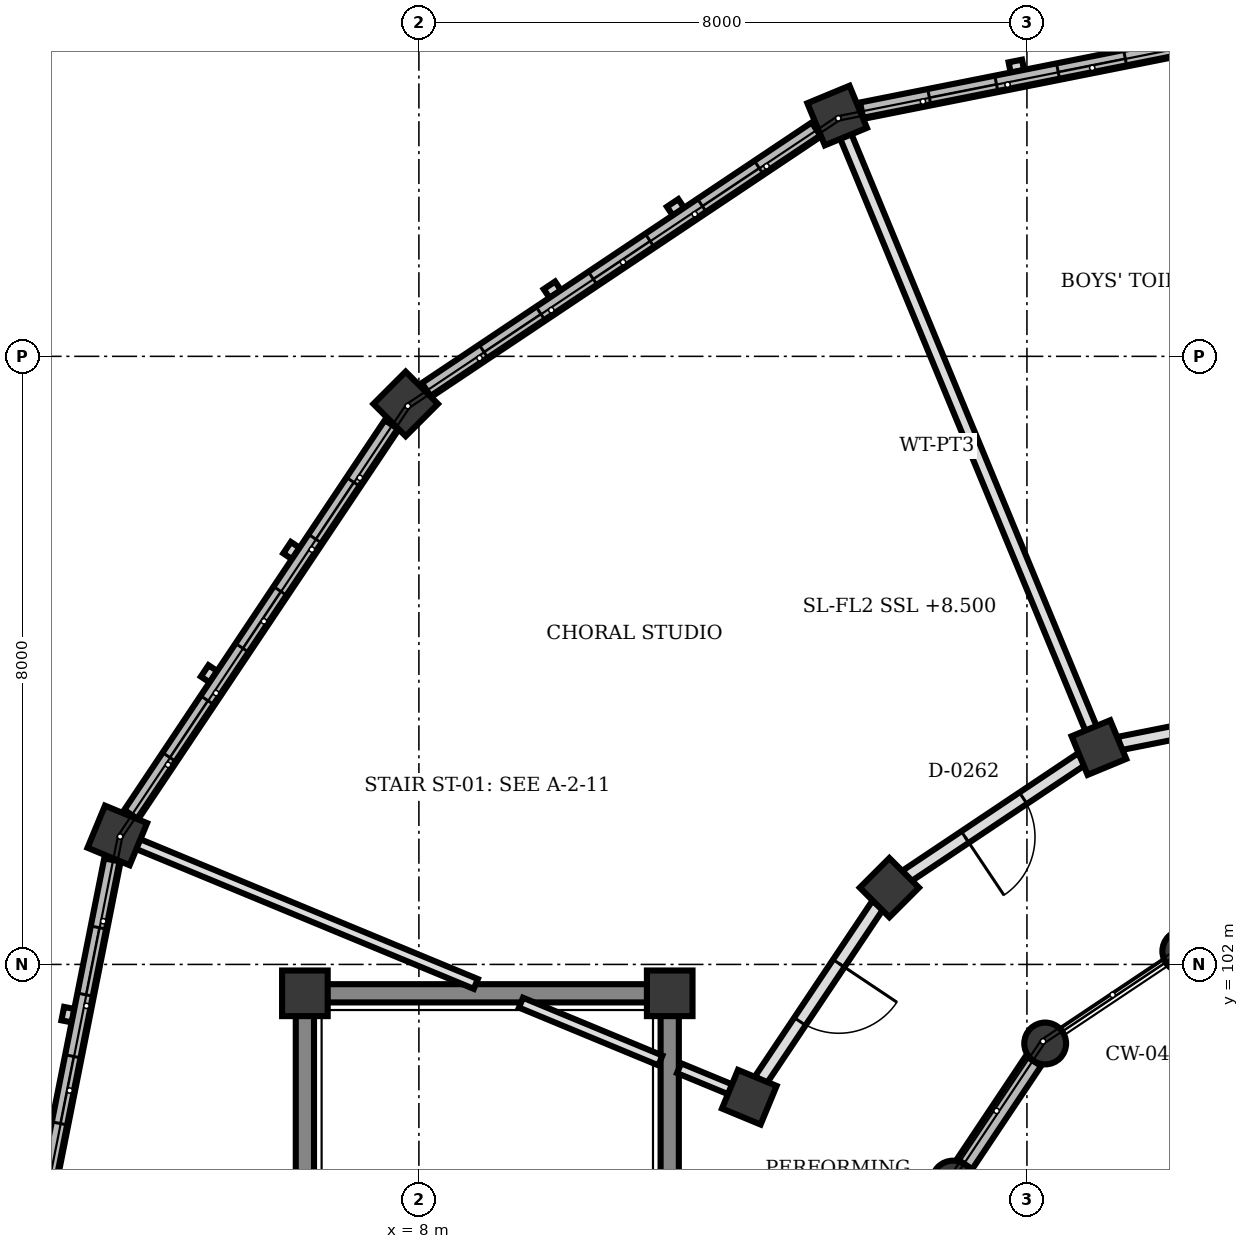
"""IFC4 building model, lengths in metres.
Left out: names, types, materials, properties, quantities, classifications, styles, units other than length and angle.
Written with IfcOpenShell. Run it as: python <this file> out.ifc"""

import sys

from ifc_helpers import new_model, si_unit, direction, frame, frame_2d, origin, origin_2d, place, context, subcontext, project, spatial, rectangle, circle, extrude, element, fill, save


model = new_model("IFC4")
c1 = context("Model", 3, precision=1e-05, world=origin(), true_north=direction((0.0, 1.0)))
c2 = subcontext(c1, "Body", "Model", "MODEL_VIEW")
j1 = project(units=[si_unit("LENGTHUNIT", "METRE"), si_unit("PLANEANGLEUNIT", "RADIAN")], contexts=[c1])
p1 = place(None, origin())
s1 = spatial("IfcSite", under=j1, at=p1, CompositionType="ELEMENT")
p2 = place(p1, origin())
s2 = spatial("IfcBuilding", under=s1, at=p2, CompositionType="ELEMENT")
p3 = place(p2, frame((0.0, 0.0, 8.5)))
s3 = spatial("IfcBuildingStorey", under=s2, at=p3, CompositionType="ELEMENT", Elevation=8.5)
for number, where, z_axis, x_axis in (
    (1, (11.3, 101.62, 0.0), (0.0, 0.0, 1.0), (1.0, 0.0, 0.0)),
    (2, (6.5, 101.62, 0.0), (0.0, 0.0, 1.0), (1.0, 0.0, 0.0)),
):
    element("IfcColumn", number, at=place(p3, frame(where, z_axis=z_axis, x_axis=x_axis)), inside=s3, PredefinedType="COLUMN", context=c2, shape_type="SweptSolid", body=[
        extrude(rectangle(XDim=0.6, YDim=0.6, at=origin_2d()), origin(), (0.0, 0.0, 1.0), 4.0),
    ])
for number, where, z_axis, x_axis in (
    (3, (18.057, 102.174, 0.0), (0.0, 0.0, 1.0), (1.0, 0.0, 0.0)),
    (4, (16.24, 100.96, 0.0), (0.0, 0.0, 1.0), (1.0, 0.0, 0.0)),
    (5, (15.026, 99.143, 0.0), (0.0, 0.0, 1.0), (1.0, 0.0, 0.0)),
):
    element("IfcColumn", number, at=place(p3, frame(where, z_axis=z_axis, x_axis=x_axis)), inside=s3, PredefinedType="COLUMN", context=c2, shape_type="SweptSolid", body=[
        extrude(circle(Radius=0.275, at=origin_2d()), origin(), (0.0, 0.0, 1.0), 4.0),
    ])
for number, where, z_axis, x_axis in (
    (6, (16.947, 104.853, 0.0), (0.0, 0.0, 1.0), (-0.383, 0.924, 0.0)),
    (7, (14.19, 103.01, 0.0), (0.0, 0.0, 1.0), (-0.707, 0.707, 0.0)),
    (8, (12.347, 100.253, 0.0), (0.0, 0.0, 1.0), (-0.924, 0.383, 0.0)),
):
    element("IfcColumn", number, at=place(p3, frame(where, z_axis=z_axis, x_axis=x_axis)), inside=s3, PredefinedType="COLUMN", context=c2, shape_type="SweptSolid", body=[
        extrude(rectangle(XDim=0.55, YDim=0.55, at=origin_2d()), origin(), (0.0, 0.0, 1.0), 4.0),
    ])
for number, where, z_axis, x_axis in (
    (9, (13.503, 113.168, 0.0), (0.0, 0.0, 1.0), (-0.383, 0.924, 0.0)),
    (10, (7.826, 109.374, 0.0), (0.0, 0.0, 1.0), (-0.707, 0.707, 0.0)),
    (11, (4.032, 103.697, 0.0), (0.0, 0.0, 1.0), (-0.924, 0.383, 0.0)),
):
    element("IfcColumn", number, at=place(p3, frame(where, z_axis=z_axis, x_axis=x_axis)), inside=s3, PredefinedType="COLUMN", context=c2, shape_type="SweptSolid", body=[
        extrude(rectangle(XDim=0.6, YDim=0.6, at=origin_2d()), origin(), (0.0, 0.0, 1.0), 4.0),
    ])
p4 = place(p3, frame((13.826, 113.232, 0.0), z_axis=(0.0, 0.0, 1.0), x_axis=(0.980770460131, 0.195164813773, 0.0)))
e12 = element("IfcWall", 12, at=p4, inside=s3, PredefinedType="SOLIDWALL", context=c2, shape_type="SweptSolid", body=[
    extrude(rectangle(XDim=6.17, YDim=0.22, at=frame_2d((3.085, 0.0))), origin(), (0.0, 0.0, 1.0), 3.172),
])
p5 = place(p4, frame((0.907, 0.0, 0.85)))
e13 = element("IfcOpeningElement", 13, at=p5, cuts=e12, PredefinedType="OPENING", context=c2, shape_type="SweptSolid", body=[
    extrude(rectangle(XDim=0.9, YDim=1.4, at=frame_2d((0.45, 0.7))), frame((0.0, 0.12, 0.0), z_axis=(0.0, -1.0, 0.0), x_axis=(1.0, 0.0, 0.0)), (0.0, 0.0, 1.0), 0.24),
])
p6 = place(p4, frame((2.635, 0.0, 0.85)))
e14 = element("IfcOpeningElement", 14, at=p6, cuts=e12, PredefinedType="OPENING", context=c2, shape_type="SweptSolid", body=[
    extrude(rectangle(XDim=0.9, YDim=1.4, at=frame_2d((0.45, 0.7))), frame((0.0, 0.12, 0.0), z_axis=(0.0, -1.0, 0.0), x_axis=(1.0, 0.0, 0.0)), (0.0, 0.0, 1.0), 0.24),
])
p7 = place(p4, frame((4.362, 0.0, 0.85)))
e15 = element("IfcOpeningElement", 15, at=p7, cuts=e12, PredefinedType="OPENING", context=c2, shape_type="SweptSolid", body=[
    extrude(rectangle(XDim=0.9, YDim=1.4, at=frame_2d((0.45, 0.7))), frame((0.0, 0.12, 0.0), z_axis=(0.0, -1.0, 0.0), x_axis=(1.0, 0.0, 0.0)), (0.0, 0.0, 1.0), 0.24),
])
p8 = place(p3, frame((8.1, 109.557, 0.0), z_axis=(0.0, 0.0, 1.0), x_axis=(0.831379966495, 0.555704374025, 0.0)))
e16 = element("IfcWall", 16, at=p8, inside=s3, PredefinedType="SOLIDWALL", context=c2, shape_type="SweptSolid", body=[
    extrude(rectangle(XDim=6.169, YDim=0.22, at=frame_2d((3.084, 0.0))), origin(), (0.0, 0.0, 1.0), 3.172),
])
p9 = place(p8, frame((0.907, 0.0, 0.85)))
e17 = element("IfcOpeningElement", 17, at=p9, cuts=e16, PredefinedType="OPENING", context=c2, shape_type="SweptSolid", body=[
    extrude(rectangle(XDim=0.9, YDim=1.4, at=frame_2d((0.45, 0.7))), frame((0.0, 0.12, 0.0), z_axis=(0.0, -1.0, 0.0), x_axis=(1.0, 0.0, 0.0)), (0.0, 0.0, 1.0), 0.24),
])
p10 = place(p8, frame((2.635, 0.0, 0.85)))
e18 = element("IfcOpeningElement", 18, at=p10, cuts=e16, PredefinedType="OPENING", context=c2, shape_type="SweptSolid", body=[
    extrude(rectangle(XDim=0.9, YDim=1.4, at=frame_2d((0.45, 0.7))), frame((0.0, 0.12, 0.0), z_axis=(0.0, -1.0, 0.0), x_axis=(1.0, 0.0, 0.0)), (0.0, 0.0, 1.0), 0.24),
])
p11 = place(p8, frame((4.362, 0.0, 0.85)))
e19 = element("IfcOpeningElement", 19, at=p11, cuts=e16, PredefinedType="OPENING", context=c2, shape_type="SweptSolid", body=[
    extrude(rectangle(XDim=0.9, YDim=1.4, at=frame_2d((0.45, 0.7))), frame((0.0, 0.12, 0.0), z_axis=(0.0, -1.0, 0.0), x_axis=(1.0, 0.0, 0.0)), (0.0, 0.0, 1.0), 0.24),
])
p12 = place(p3, frame((4.215, 103.971, 0.0), z_axis=(0.0, 0.0, 1.0), x_axis=(0.555658736667, 0.831410469242, 0.0)))
e20 = element("IfcWall", 20, at=p12, inside=s3, PredefinedType="SOLIDWALL", context=c2, shape_type="SweptSolid", body=[
    extrude(rectangle(XDim=6.169, YDim=0.22, at=frame_2d((3.084, 0.0))), origin(), (0.0, 0.0, 1.0), 3.172),
])
p13 = place(p12, frame((0.907, 0.0, 0.85)))
e21 = element("IfcOpeningElement", 21, at=p13, cuts=e20, PredefinedType="OPENING", context=c2, shape_type="SweptSolid", body=[
    extrude(rectangle(XDim=0.9, YDim=1.4, at=frame_2d((0.45, 0.7))), frame((0.0, 0.12, 0.0), z_axis=(0.0, -1.0, 0.0), x_axis=(1.0, 0.0, 0.0)), (0.0, 0.0, 1.0), 0.24),
])
p14 = place(p12, frame((2.635, 0.0, 0.85)))
e22 = element("IfcOpeningElement", 22, at=p14, cuts=e20, PredefinedType="OPENING", context=c2, shape_type="SweptSolid", body=[
    extrude(rectangle(XDim=0.9, YDim=1.4, at=frame_2d((0.45, 0.7))), frame((0.0, 0.12, 0.0), z_axis=(0.0, -1.0, 0.0), x_axis=(1.0, 0.0, 0.0)), (0.0, 0.0, 1.0), 0.24),
])
p15 = place(p12, frame((4.362, 0.0, 0.85)))
e23 = element("IfcOpeningElement", 23, at=p15, cuts=e20, PredefinedType="OPENING", context=c2, shape_type="SweptSolid", body=[
    extrude(rectangle(XDim=0.9, YDim=1.4, at=frame_2d((0.45, 0.7))), frame((0.0, 0.12, 0.0), z_axis=(0.0, -1.0, 0.0), x_axis=(1.0, 0.0, 0.0)), (0.0, 0.0, 1.0), 0.24),
])
p16 = place(p3, frame((16.086, 100.73, 0.0), z_axis=(0.0, 0.0, 1.0), x_axis=(-0.555287078904, -0.83165874011, 0.0)))
e24 = element("IfcWall", 24, at=p16, inside=s3, PredefinedType="SOLIDWALL", context=c2, shape_type="SweptSolid", body=[
    extrude(rectangle(XDim=1.632, YDim=0.24, at=frame_2d((0.816, 0.0))), origin(), (0.0, 0.0, 1.0), 3.222),
])
p17 = place(p3, frame((2.764, 97.323, 0.0), z_axis=(0.0, 0.0, 1.0), x_axis=(0.195164813773, 0.980770460131, 0.0)))
e25 = element("IfcWall", 25, at=p17, inside=s3, PredefinedType="SOLIDWALL", context=c2, shape_type="SweptSolid", body=[
    extrude(rectangle(XDim=6.17, YDim=0.22, at=frame_2d((3.085, 0.0))), origin(), (0.0, 0.0, 1.0), 3.172),
])
p18 = place(p17, frame((0.907, 0.0, 0.85)))
e26 = element("IfcOpeningElement", 26, at=p18, cuts=e25, PredefinedType="OPENING", context=c2, shape_type="SweptSolid", body=[
    extrude(rectangle(XDim=0.9, YDim=1.4, at=frame_2d((0.45, 0.7))), frame((0.0, 0.12, 0.0), z_axis=(0.0, -1.0, 0.0), x_axis=(1.0, 0.0, 0.0)), (0.0, 0.0, 1.0), 0.24),
])
p19 = place(p17, frame((2.635, 0.0, 0.85)))
e27 = element("IfcOpeningElement", 27, at=p19, cuts=e25, PredefinedType="OPENING", context=c2, shape_type="SweptSolid", body=[
    extrude(rectangle(XDim=0.9, YDim=1.4, at=frame_2d((0.45, 0.7))), frame((0.0, 0.12, 0.0), z_axis=(0.0, -1.0, 0.0), x_axis=(1.0, 0.0, 0.0)), (0.0, 0.0, 1.0), 0.24),
])
p20 = place(p17, frame((4.362, 0.0, 0.85)))
e28 = element("IfcOpeningElement", 28, at=p20, cuts=e25, PredefinedType="OPENING", context=c2, shape_type="SweptSolid", body=[
    extrude(rectangle(XDim=0.9, YDim=1.4, at=frame_2d((0.45, 0.7))), frame((0.0, 0.12, 0.0), z_axis=(0.0, -1.0, 0.0), x_axis=(1.0, 0.0, 0.0)), (0.0, 0.0, 1.0), 0.24),
])
p21 = place(p3, frame((6.5, 93.192, 0.0), z_axis=(0.0, 0.0, 1.0), x_axis=(0.0, 1.0, 0.0)))
e29 = element("IfcWall", 29, at=p21, inside=s3, PredefinedType="SHEAR", context=c2, shape_type="SweptSolid", body=[
    extrude(rectangle(XDim=8.136, YDim=0.24, at=frame_2d((4.068, 0.0))), origin(), (0.0, 0.0, 1.0), 3.74),
])
p22 = place(p3, frame((11.3, 101.328, 0.0), z_axis=(0.0, 0.0, 1.0), x_axis=(0.0, -1.0, 0.0)))
e30 = element("IfcWall", 30, at=p22, inside=s3, PredefinedType="SHEAR", context=c2, shape_type="SweptSolid", body=[
    extrude(rectangle(XDim=8.136, YDim=0.24, at=frame_2d((4.068, 0.0))), origin(), (0.0, 0.0, 1.0), 3.74),
])
p23 = place(p22, frame((6.244, 0.0, 0.0)))
e31 = element("IfcOpeningElement", 31, at=p23, cuts=e30, PredefinedType="OPENING", context=c2, shape_type="SweptSolid", body=[
    extrude(rectangle(XDim=0.88, YDim=2.1, at=frame_2d((0.44, 1.05))), frame((0.0, 0.13, 0.0), z_axis=(0.0, -1.0, 0.0), x_axis=(1.0, 0.0, 0.0)), (0.0, 0.0, 1.0), 0.26),
])
p24 = place(p3, frame((11.008, 101.62, 0.0), z_axis=(0.0, 0.0, 1.0), x_axis=(-1.0, 0.0, 0.0)))
e32 = element("IfcWall", 32, at=p24, inside=s3, PredefinedType="SHEAR", context=c2, shape_type="SweptSolid", body=[
    extrude(rectangle(XDim=4.216, YDim=0.24, at=frame_2d((2.108, 0.0))), origin(), (0.0, 0.0, 1.0), 3.74),
])
p25 = place(p3, frame((16.845, 105.1, 0.0), z_axis=(0.0, 0.0, 1.0), x_axis=(-0.382683896966, 0.923879340067, 0.0)))
e33 = element("IfcWall", 33, at=p25, inside=s3, PredefinedType="PARTITIONING", context=c2, shape_type="SweptSolid", body=[
    extrude(rectangle(XDim=8.44, YDim=0.16, at=frame_2d((4.22, 0.0))), origin(), (0.0, 0.0, 1.0), 3.072),
])
p26 = place(p3, frame((12.1, 100.355, 0.0), z_axis=(0.0, 0.0, 1.0), x_axis=(-0.924069600435, 0.382224245113, 0.0)))
e34 = element("IfcWall", 34, at=p26, inside=s3, PredefinedType="PARTITIONING", context=c2, shape_type="SweptSolid", body=[
    extrude(rectangle(XDim=0.733, YDim=0.14, at=frame_2d((0.366, 0.0))), origin(), (0.0, 0.0, 1.0), 3.7),
])
p27 = place(p3, frame((11.177, 100.737, 0.0), z_axis=(0.0, 0.0, 1.0), x_axis=(-0.923817443679, 0.382833293686, 0.0)))
e35 = element("IfcWall", 35, at=p27, inside=s3, PredefinedType="PARTITIONING", context=c2, shape_type="SweptSolid", body=[
    extrude(rectangle(XDim=1.985, YDim=0.14, at=frame_2d((0.993, 0.0))), origin(), (0.0, 0.0, 1.0), 3.7),
])
p28 = place(p3, frame((8.749, 101.743, 0.0), z_axis=(0.0, 0.0, 1.0), x_axis=(-0.923877739946, 0.382687759972, 0.0)))
e36 = element("IfcWall", 36, at=p28, inside=s3, PredefinedType="PARTITIONING", context=c2, shape_type="SweptSolid", body=[
    extrude(rectangle(XDim=4.813, YDim=0.14, at=frame_2d((2.407, 0.0))), origin(), (0.0, 0.0, 1.0), 3.7),
])
p29 = place(p3, frame((19.933, 105.447, 0.0), z_axis=(0.0, 0.0, 1.0), x_axis=(-0.980773264811, -0.195150718759, 0.0)))
e37 = element("IfcWall", 37, at=p29, inside=s3, PredefinedType="PARTITIONING", context=c2, shape_type="SweptSolid", body=[
    extrude(rectangle(XDim=2.772, YDim=0.18, at=frame_2d((1.386, 0.0))), origin(), (0.0, 0.0, 1.0), 3.072),
])
p30 = place(p29, frame((0.926, 0.0, 0.0)))
e38 = element("IfcOpeningElement", 38, at=p30, cuts=e37, PredefinedType="OPENING", context=c2, shape_type="SweptSolid", body=[
    extrude(rectangle(XDim=0.92, YDim=2.1, at=frame_2d((0.46, 1.05))), frame((0.0, 0.1, 0.0), z_axis=(0.0, -1.0, 0.0), x_axis=(1.0, 0.0, 0.0)), (0.0, 0.0, 1.0), 0.2),
])
p31 = place(p3, frame((16.721, 104.702, 0.0), z_axis=(0.0, 0.0, 1.0), x_axis=(-0.831318045056, -0.555797002478, 0.0)))
e39 = element("IfcWall", 39, at=p31, inside=s3, PredefinedType="PARTITIONING", context=c2, shape_type="SweptSolid", body=[
    extrude(rectangle(XDim=2.773, YDim=0.18, at=frame_2d((1.386, 0.0))), origin(), (0.0, 0.0, 1.0), 3.072),
])
p32 = place(p31, frame((0.926, 0.0, 0.0)))
e40 = element("IfcOpeningElement", 40, at=p32, cuts=e39, PredefinedType="OPENING", context=c2, shape_type="SweptSolid", body=[
    extrude(rectangle(XDim=0.92, YDim=2.1, at=frame_2d((0.46, 1.05))), frame((0.0, 0.1, 0.0), z_axis=(0.0, -1.0, 0.0), x_axis=(1.0, 0.0, 0.0)), (0.0, 0.0, 1.0), 0.2),
])
p33 = place(p3, frame((14.039, 102.784, 0.0), z_axis=(0.0, 0.0, 1.0), x_axis=(-0.555797002478, -0.831318045056, 0.0)))
e41 = element("IfcWall", 41, at=p33, inside=s3, PredefinedType="PARTITIONING", context=c2, shape_type="SweptSolid", body=[
    extrude(rectangle(XDim=2.773, YDim=0.18, at=frame_2d((1.386, 0.0))), origin(), (0.0, 0.0, 1.0), 3.072),
])
p34 = place(p33, frame((0.926, 0.0, 0.0)))
e42 = element("IfcOpeningElement", 42, at=p34, cuts=e41, PredefinedType="OPENING", context=c2, shape_type="SweptSolid", body=[
    extrude(rectangle(XDim=0.92, YDim=2.1, at=frame_2d((0.46, 1.05))), frame((0.0, 0.1, 0.0), z_axis=(0.0, -1.0, 0.0), x_axis=(1.0, 0.0, 0.0)), (0.0, 0.0, 1.0), 0.2),
])
p35 = place(p5, origin())
e43 = element("IfcWindow", 43, at=p35, inside=s3, PartitioningType="SINGLE_PANEL", PredefinedType="WINDOW", context=c2, shape_type="SweptSolid", body=[
    extrude(rectangle(XDim=0.9, YDim=1.4, at=frame_2d((0.45, 0.7))), frame((0.0, 0.03, 0.0), z_axis=(0.0, -1.0, 0.0), x_axis=(1.0, 0.0, 0.0)), (0.0, 0.0, 1.0), 0.06),
])
fill(e13, e43)
p36 = place(p6, origin())
e44 = element("IfcWindow", 44, at=p36, inside=s3, PartitioningType="SINGLE_PANEL", PredefinedType="WINDOW", context=c2, shape_type="SweptSolid", body=[
    extrude(rectangle(XDim=0.9, YDim=1.4, at=frame_2d((0.45, 0.7))), frame((0.0, 0.03, 0.0), z_axis=(0.0, -1.0, 0.0), x_axis=(1.0, 0.0, 0.0)), (0.0, 0.0, 1.0), 0.06),
])
fill(e14, e44)
p37 = place(p9, origin())
e45 = element("IfcWindow", 45, at=p37, inside=s3, PartitioningType="SINGLE_PANEL", PredefinedType="WINDOW", context=c2, shape_type="SweptSolid", body=[
    extrude(rectangle(XDim=0.9, YDim=1.4, at=frame_2d((0.45, 0.7))), frame((0.0, 0.03, 0.0), z_axis=(0.0, -1.0, 0.0), x_axis=(1.0, 0.0, 0.0)), (0.0, 0.0, 1.0), 0.06),
])
fill(e17, e45)
p38 = place(p10, origin())
e46 = element("IfcWindow", 46, at=p38, inside=s3, PartitioningType="SINGLE_PANEL", PredefinedType="WINDOW", context=c2, shape_type="SweptSolid", body=[
    extrude(rectangle(XDim=0.9, YDim=1.4, at=frame_2d((0.45, 0.7))), frame((0.0, 0.03, 0.0), z_axis=(0.0, -1.0, 0.0), x_axis=(1.0, 0.0, 0.0)), (0.0, 0.0, 1.0), 0.06),
])
fill(e18, e46)
p39 = place(p11, origin())
e47 = element("IfcWindow", 47, at=p39, inside=s3, PartitioningType="SINGLE_PANEL", PredefinedType="WINDOW", context=c2, shape_type="SweptSolid", body=[
    extrude(rectangle(XDim=0.9, YDim=1.4, at=frame_2d((0.45, 0.7))), frame((0.0, 0.03, 0.0), z_axis=(0.0, -1.0, 0.0), x_axis=(1.0, 0.0, 0.0)), (0.0, 0.0, 1.0), 0.06),
])
fill(e19, e47)
p40 = place(p13, origin())
e48 = element("IfcWindow", 48, at=p40, inside=s3, PartitioningType="SINGLE_PANEL", PredefinedType="WINDOW", context=c2, shape_type="SweptSolid", body=[
    extrude(rectangle(XDim=0.9, YDim=1.4, at=frame_2d((0.45, 0.7))), frame((0.0, 0.03, 0.0), z_axis=(0.0, -1.0, 0.0), x_axis=(1.0, 0.0, 0.0)), (0.0, 0.0, 1.0), 0.06),
])
fill(e21, e48)
p41 = place(p14, origin())
e49 = element("IfcWindow", 49, at=p41, inside=s3, PartitioningType="SINGLE_PANEL", PredefinedType="WINDOW", context=c2, shape_type="SweptSolid", body=[
    extrude(rectangle(XDim=0.9, YDim=1.4, at=frame_2d((0.45, 0.7))), frame((0.0, 0.03, 0.0), z_axis=(0.0, -1.0, 0.0), x_axis=(1.0, 0.0, 0.0)), (0.0, 0.0, 1.0), 0.06),
])
fill(e22, e49)
p42 = place(p15, origin())
e50 = element("IfcWindow", 50, at=p42, inside=s3, PartitioningType="SINGLE_PANEL", PredefinedType="WINDOW", context=c2, shape_type="SweptSolid", body=[
    extrude(rectangle(XDim=0.9, YDim=1.4, at=frame_2d((0.45, 0.7))), frame((0.0, 0.03, 0.0), z_axis=(0.0, -1.0, 0.0), x_axis=(1.0, 0.0, 0.0)), (0.0, 0.0, 1.0), 0.06),
])
fill(e23, e50)
p43 = place(p19, origin())
e51 = element("IfcWindow", 51, at=p43, inside=s3, PartitioningType="SINGLE_PANEL", PredefinedType="WINDOW", context=c2, shape_type="SweptSolid", body=[
    extrude(rectangle(XDim=0.9, YDim=1.4, at=frame_2d((0.45, 0.7))), frame((0.0, 0.03, 0.0), z_axis=(0.0, -1.0, 0.0), x_axis=(1.0, 0.0, 0.0)), (0.0, 0.0, 1.0), 0.06),
])
fill(e27, e51)
p44 = place(p20, origin())
e52 = element("IfcWindow", 52, at=p44, inside=s3, PartitioningType="SINGLE_PANEL", PredefinedType="WINDOW", context=c2, shape_type="SweptSolid", body=[
    extrude(rectangle(XDim=0.9, YDim=1.4, at=frame_2d((0.45, 0.7))), frame((0.0, 0.03, 0.0), z_axis=(0.0, -1.0, 0.0), x_axis=(1.0, 0.0, 0.0)), (0.0, 0.0, 1.0), 0.06),
])
fill(e28, e52)
p45 = place(p32, origin())
e53 = element("IfcDoor", 53, at=p45, inside=s3, OperationType="SINGLE_SWING_RIGHT", PredefinedType="DOOR", context=c2, shape_type="SweptSolid", body=[
    extrude(rectangle(XDim=0.92, YDim=2.1, at=frame_2d((0.46, 1.05))), frame((0.0, 0.025, 0.0), z_axis=(0.0, -1.0, 0.0), x_axis=(1.0, 0.0, 0.0)), (0.0, 0.0, 1.0), 0.05),
])
fill(e40, e53)
p46 = place(p34, origin())
e54 = element("IfcDoor", 54, at=p46, inside=s3, OperationType="SINGLE_SWING_LEFT", PredefinedType="DOOR", context=c2, shape_type="SweptSolid", body=[
    extrude(rectangle(XDim=0.92, YDim=2.1, at=frame_2d((0.46, 1.05))), frame((0.0, 0.025, 0.0), z_axis=(0.0, -1.0, 0.0), x_axis=(1.0, 0.0, 0.0)), (0.0, 0.0, 1.0), 0.05),
])
fill(e42, e54)
save(model, sys.argv[1])
